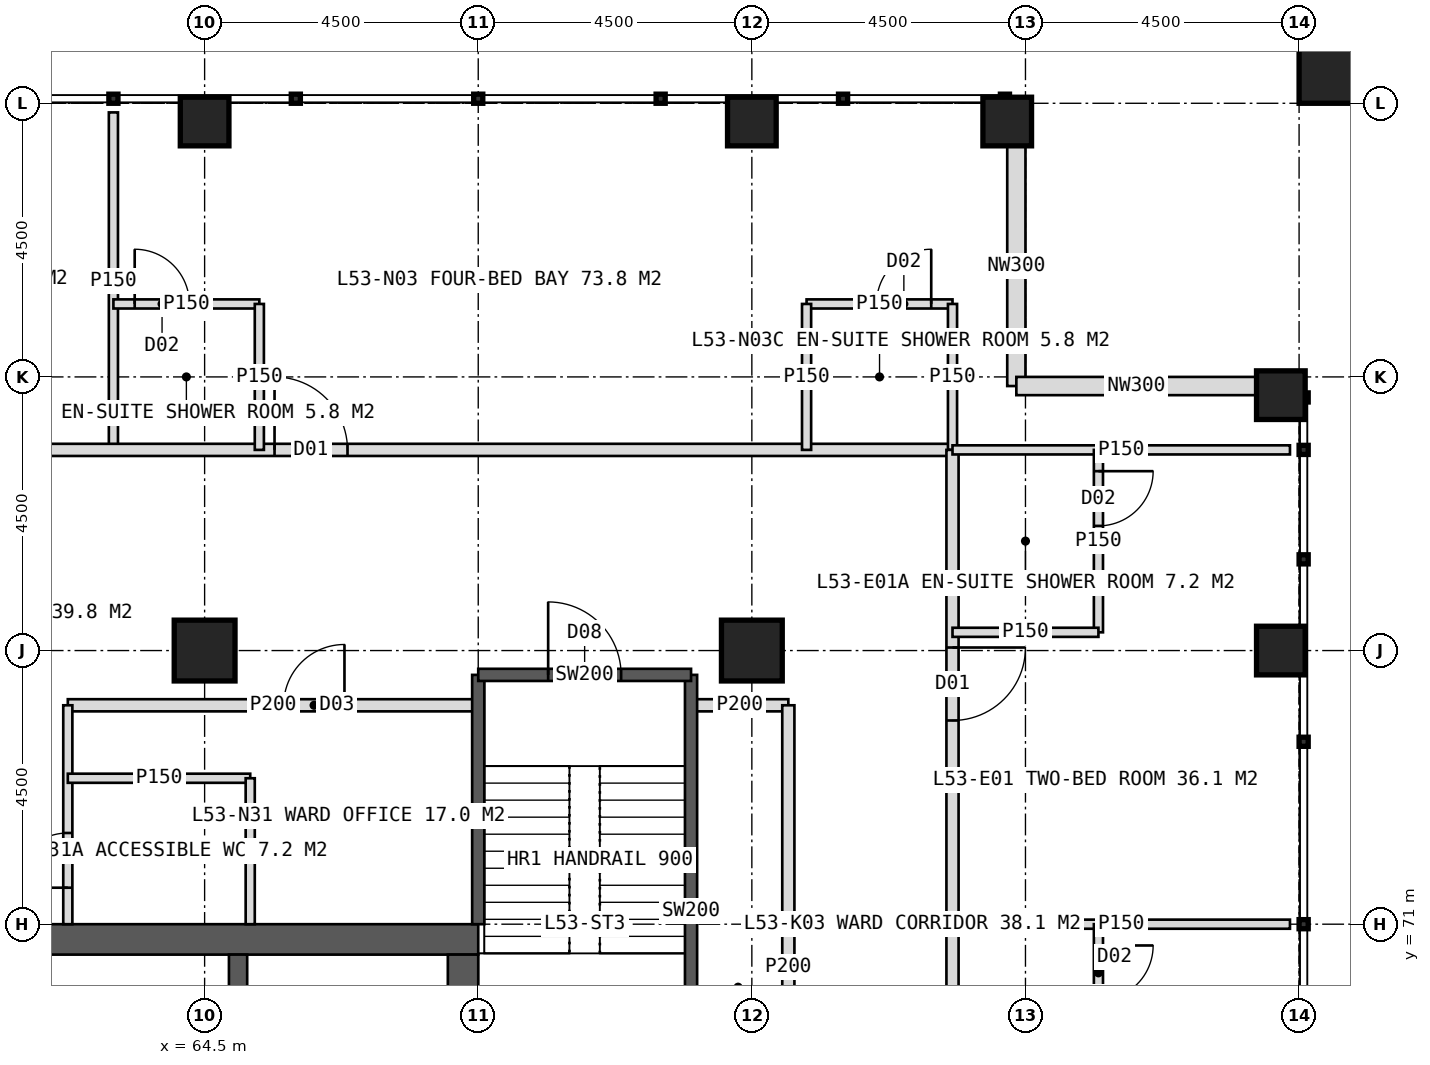
"""IFC4 building model, lengths in metres.
Left out: names, types, materials, properties, quantities, classifications, styles, units other than length and angle.
Written with IfcOpenShell. Run it as: python <this file> out.ifc"""

import sys

from ifc_helpers import new_model, si_unit, direction, frame, frame_2d, origin, origin_2d, place, context, subcontext, project, spatial, rectangle, hollow_rectangle, extrude, element, fill, save


model = new_model("IFC4")
c1 = context("Model", 3, precision=1e-05, world=origin(), true_north=direction((0.0, 1.0)))
c2 = subcontext(c1, "Body", "Model", "MODEL_VIEW")
j1 = project(units=[si_unit("LENGTHUNIT", "METRE"), si_unit("PLANEANGLEUNIT", "RADIAN")], contexts=[c1])
p1 = place(None, origin())
s1 = spatial("IfcSite", under=j1, at=p1, CompositionType="ELEMENT")
p2 = place(p1, origin())
s2 = spatial("IfcBuilding", under=s1, at=p2, CompositionType="ELEMENT")
p3 = place(p2, frame((0.0, 0.0, 221.0)))
s3 = spatial("IfcBuildingStorey", under=s2, at=p3, CompositionType="ELEMENT", Elevation=221.0)
p4 = place(p3, frame((51.0, 70.75, 0.0), z_axis=(0.0, 0.0, 1.0), x_axis=(1.0, 0.0, 0.0)))
e1 = element("IfcWall", 1, at=p4, inside=s3, PredefinedType="SHEAR", context=c2, shape_type="SweptSolid", body=[
    extrude(rectangle(XDim=18.0, YDim=0.5, at=frame_2d((9.0, 0.0))), origin(), (0.0, 0.0, 1.0), 4.0),
])
p5 = place(p4, frame((8.1, 0.0, 0.0)))
e2 = element("IfcOpeningElement", 2, at=p5, cuts=e1, PredefinedType="OPENING", context=c2, shape_type="SweptSolid", body=[
    extrude(rectangle(XDim=1.8, YDim=2.2, at=frame_2d((0.9, 1.1))), frame((0.0, 0.26, 0.0), z_axis=(0.0, -1.0, 0.0), x_axis=(1.0, 0.0, 0.0)), (0.0, 0.0, 1.0), 0.52),
])
p6 = place(p3, frame((68.75, 53.5, 0.0), z_axis=(0.0, 0.0, 1.0), x_axis=(0.0, 1.0, 0.0)))
e3 = element("IfcWall", 3, at=p6, inside=s3, PredefinedType="SHEAR", context=c2, shape_type="SweptSolid", body=[
    extrude(rectangle(XDim=17.0, YDim=0.5, at=frame_2d((8.5, 0.0))), origin(), (0.0, 0.0, 1.0), 4.0),
])
p7 = place(p6, frame((9.6, 0.0, 0.0)))
e4 = element("IfcOpeningElement", 4, at=p7, cuts=e3, PredefinedType="OPENING", context=c2, shape_type="SweptSolid", body=[
    extrude(rectangle(XDim=1.5, YDim=2.2, at=frame_2d((0.75, 1.1))), frame((0.0, 0.26, 0.0), z_axis=(0.0, -1.0, 0.0), x_axis=(1.0, 0.0, 0.0)), (0.0, 0.0, 1.0), 0.52),
])
p8 = place(p3, frame((65.05, 53.5, 0.0), z_axis=(0.0, 0.0, 1.0), x_axis=(0.0, 1.0, 0.0)))
e5 = element("IfcWall", 5, at=p8, inside=s3, PredefinedType="SHEAR", context=c2, shape_type="SweptSolid", body=[
    extrude(rectangle(XDim=17.0, YDim=0.3, at=frame_2d((8.5, 0.0))), origin(), (0.0, 0.0, 1.0), 4.0),
])
for number, where, z_axis, x_axis in (
    (6, (73.5, 75.5, 0.0), (0.0, 0.0, 1.0), (1.0, 0.0, 0.0)),
    (7, (64.5, 75.5, 0.0), (0.0, 0.0, 1.0), (1.0, 0.0, 0.0)),
):
    element("IfcColumn", number, at=place(p3, frame(where, z_axis=z_axis, x_axis=x_axis)), inside=s3, PredefinedType="COLUMN", context=c2, shape_type="SweptSolid", body=[
        extrude(hollow_rectangle(XDim=1.0, YDim=1.0, WallThickness=0.1, at=origin_2d()), origin(), (0.0, 0.0, 1.0), 4.0),
    ])
for number, where, z_axis, x_axis in (
    (8, (64.5, 84.2, 0.0), (0.0, 0.0, 1.0), (1.0, 0.0, 0.0)),
    (9, (73.5, 84.2, 0.0), (0.0, 0.0, 1.0), (1.0, 0.0, 0.0)),
    (10, (82.2, 75.5, 0.0), (0.0, 0.0, 1.0), (1.0, 0.0, 0.0)),
    (11, (77.7, 84.2, 0.0), (0.0, 0.0, 1.0), (1.0, 0.0, 0.0)),
    (12, (82.2, 79.7, 0.0), (0.0, 0.0, 1.0), (1.0, 0.0, 0.0)),
):
    element("IfcColumn", number, at=place(p3, frame(where, z_axis=z_axis, x_axis=x_axis)), inside=s3, PredefinedType="COLUMN", context=c2, shape_type="SweptSolid", body=[
        extrude(hollow_rectangle(XDim=0.8, YDim=0.8, WallThickness=0.08, at=origin_2d()), origin(), (0.0, 0.0, 1.0), 4.0),
    ])
p9 = place(p3, frame((83.1, 85.1, 0.0), z_axis=(0.0, 0.0, 1.0), x_axis=(1.0, 0.0, 0.0)))
e13 = element("IfcColumn", 13, at=p9, inside=s3, PredefinedType="COLUMN", context=c2, shape_type="SweptSolid", body=[
    extrude(hollow_rectangle(XDim=1.2, YDim=1.2, WallThickness=0.07, at=origin_2d()), origin(), (0.0, 0.0, 1.0), 4.0),
])
for number, where, z_axis, x_axis in (
    (14, (77.85, 83.8, 0.0), (0.0, 0.0, 1.0), (0.0, -1.0, 0.0)),
    (15, (77.85, 79.85, 0.0), (0.0, 0.0, 1.0), (1.0, 0.0, 0.0)),
):
    element("IfcWall", number, at=place(p3, frame(where, z_axis=z_axis, x_axis=x_axis)), inside=s3, PredefinedType="ELEMENTEDWALL", context=c2, shape_type="SweptSolid", body=[
        extrude(rectangle(XDim=3.95, YDim=0.3, at=frame_2d((1.975, 0.0))), origin(), (0.0, 0.0, 1.0), 2.85),
    ])
p10 = place(p3, frame((63.0, 78.8, 0.0), z_axis=(0.0, 0.0, 1.0), x_axis=(0.0, 1.0, 0.0)))
e16 = element("IfcWall", 16, at=p10, inside=s3, PredefinedType="PARTITIONING", context=c2, shape_type="SweptSolid", body=[
    extrude(rectangle(XDim=5.55, YDim=0.15, at=frame_2d((2.775, 0.0))), origin(), (0.0, 0.0, 1.0), 3.75),
])
p11 = place(p3, frame((43.2, 78.8, 0.0), z_axis=(0.0, 0.0, 1.0), x_axis=(1.0, 0.0, 0.0)))
e17 = element("IfcWall", 17, at=p11, inside=s3, PredefinedType="PARTITIONING", context=c2, shape_type="SweptSolid", body=[
    extrude(rectangle(XDim=33.6, YDim=0.2, at=frame_2d((16.8, 0.0))), origin(), (0.0, 0.0, 1.0), 3.75),
])
p12 = place(p11, frame((4.9, 0.0, 0.0)))
e18 = element("IfcOpeningElement", 18, at=p12, cuts=e17, PredefinedType="OPENING", context=c2, shape_type="SweptSolid", body=[
    extrude(rectangle(XDim=1.0, YDim=2.1, at=frame_2d((0.5, 1.05))), frame((0.0, 0.11, 0.0), z_axis=(0.0, -1.0, 0.0), x_axis=(1.0, 0.0, 0.0)), (0.0, 0.0, 1.0), 0.22),
])
p13 = place(p11, frame((14.05, 0.0, 0.0)))
e19 = element("IfcOpeningElement", 19, at=p13, cuts=e17, PredefinedType="OPENING", context=c2, shape_type="SweptSolid", body=[
    extrude(rectangle(XDim=1.2, YDim=2.2, at=frame_2d((0.6, 1.1))), frame((0.0, 0.11, 0.0), z_axis=(0.0, -1.0, 0.0), x_axis=(1.0, 0.0, 0.0)), (0.0, 0.0, 1.0), 0.22),
])
p14 = place(p11, frame((22.45, 0.0, 0.0)))
e20 = element("IfcOpeningElement", 20, at=p14, cuts=e17, PredefinedType="OPENING", context=c2, shape_type="SweptSolid", body=[
    extrude(rectangle(XDim=1.2, YDim=2.2, at=frame_2d((0.6, 1.1))), frame((0.0, 0.11, 0.0), z_axis=(0.0, -1.0, 0.0), x_axis=(1.0, 0.0, 0.0)), (0.0, 0.0, 1.0), 0.22),
])
p15 = place(p3, frame((63.0, 81.2, 0.0), z_axis=(0.0, 0.0, 1.0), x_axis=(1.0, 0.0, 0.0)))
e21 = element("IfcWall", 21, at=p15, inside=s3, PredefinedType="PARTITIONING", context=c2, shape_type="SweptSolid", body=[
    extrude(rectangle(XDim=2.4, YDim=0.15, at=frame_2d((1.2, 0.0))), origin(), (0.0, 0.0, 1.0), 3.75),
])
p16 = place(p15, frame((0.35, 0.0, 0.0)))
e22 = element("IfcOpeningElement", 22, at=p16, cuts=e21, PredefinedType="OPENING", context=c2, shape_type="SweptSolid", body=[
    extrude(rectangle(XDim=0.9, YDim=2.1, at=frame_2d((0.45, 1.05))), frame((0.0, 0.085, 0.0), z_axis=(0.0, -1.0, 0.0), x_axis=(1.0, 0.0, 0.0)), (0.0, 0.0, 1.0), 0.17),
])
p17 = place(p3, frame((65.4, 78.8, 0.0), z_axis=(0.0, 0.0, 1.0), x_axis=(0.0, 1.0, 0.0)))
e23 = element("IfcWall", 23, at=p17, inside=s3, PredefinedType="PARTITIONING", context=c2, shape_type="SweptSolid", body=[
    extrude(rectangle(XDim=2.4, YDim=0.15, at=frame_2d((1.2, 0.0))), origin(), (0.0, 0.0, 1.0), 3.75),
])
p18 = place(p3, frame((74.4, 81.2, 0.0), z_axis=(0.0, 0.0, 1.0), x_axis=(1.0, 0.0, 0.0)))
e24 = element("IfcWall", 24, at=p18, inside=s3, PredefinedType="PARTITIONING", context=c2, shape_type="SweptSolid", body=[
    extrude(rectangle(XDim=2.4, YDim=0.15, at=frame_2d((1.2, 0.0))), origin(), (0.0, 0.0, 1.0), 3.75),
])
p19 = place(p18, frame((1.15, 0.0, 0.0)))
e25 = element("IfcOpeningElement", 25, at=p19, cuts=e24, PredefinedType="OPENING", context=c2, shape_type="SweptSolid", body=[
    extrude(rectangle(XDim=0.9, YDim=2.1, at=frame_2d((0.45, 1.05))), frame((0.0, 0.085, 0.0), z_axis=(0.0, -1.0, 0.0), x_axis=(1.0, 0.0, 0.0)), (0.0, 0.0, 1.0), 0.17),
])
for number, where, z_axis, x_axis in (
    (26, (74.4, 78.8, 0.0), (0.0, 0.0, 1.0), (0.0, 1.0, 0.0)),
    (27, (76.8, 78.8, 0.0), (0.0, 0.0, 1.0), (0.0, 1.0, 0.0)),
):
    element("IfcWall", number, at=place(p3, frame(where, z_axis=z_axis, x_axis=x_axis)), inside=s3, PredefinedType="PARTITIONING", context=c2, shape_type="SweptSolid", body=[
        extrude(rectangle(XDim=2.4, YDim=0.15, at=frame_2d((1.2, 0.0))), origin(), (0.0, 0.0, 1.0), 3.75),
    ])
p20 = place(p3, frame((62.25, 74.6, 0.0), z_axis=(0.0, 0.0, 1.0), x_axis=(1.0, 0.0, 0.0)))
e28 = element("IfcWall", 28, at=p20, inside=s3, PredefinedType="PARTITIONING", context=c2, shape_type="SweptSolid", body=[
    extrude(rectangle(XDim=6.75, YDim=0.2, at=frame_2d((3.375, 0.0))), origin(), (0.0, 0.0, 1.0), 3.75),
])
p21 = place(p20, frame((3.55, 0.0, 0.0)))
e29 = element("IfcOpeningElement", 29, at=p21, cuts=e28, PredefinedType="OPENING", context=c2, shape_type="SweptSolid", body=[
    extrude(rectangle(XDim=1.0, YDim=2.1, at=frame_2d((0.5, 1.05))), frame((0.0, 0.11, 0.0), z_axis=(0.0, -1.0, 0.0), x_axis=(1.0, 0.0, 0.0)), (0.0, 0.0, 1.0), 0.22),
])
p22 = place(p3, frame((72.5, 74.6, 0.0), z_axis=(0.0, 0.0, 1.0), x_axis=(1.0, 0.0, 0.0)))
e30 = element("IfcWall", 30, at=p22, inside=s3, PredefinedType="PARTITIONING", context=c2, shape_type="SweptSolid", body=[
    extrude(rectangle(XDim=1.6, YDim=0.2, at=frame_2d((0.8, 0.0))), origin(), (0.0, 0.0, 1.0), 3.75),
])
p23 = place(p3, frame((62.25, 71.0, 0.0), z_axis=(0.0, 0.0, 1.0), x_axis=(0.0, 1.0, 0.0)))
e31 = element("IfcWall", 31, at=p23, inside=s3, PredefinedType="PARTITIONING", context=c2, shape_type="SweptSolid", body=[
    extrude(rectangle(XDim=3.6, YDim=0.15, at=frame_2d((1.8, 0.0))), origin(), (0.0, 0.0, 1.0), 3.75),
])
p24 = place(p23, frame((0.6, 0.0, 0.0)))
e32 = element("IfcOpeningElement", 32, at=p24, cuts=e31, PredefinedType="OPENING", context=c2, shape_type="SweptSolid", body=[
    extrude(rectangle(XDim=0.9, YDim=2.1, at=frame_2d((0.45, 1.05))), frame((0.0, 0.085, 0.0), z_axis=(0.0, -1.0, 0.0), x_axis=(1.0, 0.0, 0.0)), (0.0, 0.0, 1.0), 0.17),
])
p25 = place(p3, frame((62.25, 73.4, 0.0), z_axis=(0.0, 0.0, 1.0), x_axis=(1.0, 0.0, 0.0)))
e33 = element("IfcWall", 33, at=p25, inside=s3, PredefinedType="PARTITIONING", context=c2, shape_type="SweptSolid", body=[
    extrude(rectangle(XDim=3.0, YDim=0.15, at=frame_2d((1.5, 0.0))), origin(), (0.0, 0.0, 1.0), 3.75),
])
p26 = place(p3, frame((65.25, 71.0, 0.0), z_axis=(0.0, 0.0, 1.0), x_axis=(0.0, 1.0, 0.0)))
e34 = element("IfcWall", 34, at=p26, inside=s3, PredefinedType="PARTITIONING", context=c2, shape_type="SweptSolid", body=[
    extrude(rectangle(XDim=2.4, YDim=0.15, at=frame_2d((1.2, 0.0))), origin(), (0.0, 0.0, 1.0), 3.75),
])
p27 = place(p3, frame((76.8, 71.0, 0.0), z_axis=(0.0, 0.0, 1.0), x_axis=(1.0, 0.0, 0.0)))
e35 = element("IfcWall", 35, at=p27, inside=s3, PredefinedType="PARTITIONING", context=c2, shape_type="SweptSolid", body=[
    extrude(rectangle(XDim=5.55, YDim=0.15, at=frame_2d((2.775, 0.0))), origin(), (0.0, 0.0, 1.0), 3.75),
])
p28 = place(p3, frame((76.8, 78.8, 0.0), z_axis=(0.0, 0.0, 1.0), x_axis=(0.0, -1.0, 0.0)))
e36 = element("IfcWall", 36, at=p28, inside=s3, PredefinedType="PARTITIONING", context=c2, shape_type="SweptSolid", body=[
    extrude(rectangle(XDim=33.6, YDim=0.2, at=frame_2d((16.8, 0.0))), origin(), (0.0, 0.0, 1.0), 3.75),
])
p29 = place(p28, frame((3.25, 0.0, 0.0)))
e37 = element("IfcOpeningElement", 37, at=p29, cuts=e36, PredefinedType="OPENING", context=c2, shape_type="SweptSolid", body=[
    extrude(rectangle(XDim=1.2, YDim=2.2, at=frame_2d((0.6, 1.1))), frame((0.0, 0.11, 0.0), z_axis=(0.0, -1.0, 0.0), x_axis=(1.0, 0.0, 0.0)), (0.0, 0.0, 1.0), 0.22),
])
p30 = place(p28, frame((10.45, 0.0, 0.0)))
e38 = element("IfcOpeningElement", 38, at=p30, cuts=e36, PredefinedType="OPENING", context=c2, shape_type="SweptSolid", body=[
    extrude(rectangle(XDim=1.2, YDim=2.2, at=frame_2d((0.6, 1.1))), frame((0.0, 0.11, 0.0), z_axis=(0.0, -1.0, 0.0), x_axis=(1.0, 0.0, 0.0)), (0.0, 0.0, 1.0), 0.22),
])
p31 = place(p28, frame((14.8, 0.0, 0.0)))
e39 = element("IfcOpeningElement", 39, at=p31, cuts=e36, PredefinedType="OPENING", context=c2, shape_type="SweptSolid", body=[
    extrude(rectangle(XDim=1.0, YDim=2.1, at=frame_2d((0.5, 1.05))), frame((0.0, 0.11, 0.0), z_axis=(0.0, -1.0, 0.0), x_axis=(1.0, 0.0, 0.0)), (0.0, 0.0, 1.0), 0.22),
])
p32 = place(p28, frame((20.05, 0.0, 0.0)))
e40 = element("IfcOpeningElement", 40, at=p32, cuts=e36, PredefinedType="OPENING", context=c2, shape_type="SweptSolid", body=[
    extrude(rectangle(XDim=1.2, YDim=2.2, at=frame_2d((0.6, 1.1))), frame((0.0, 0.11, 0.0), z_axis=(0.0, -1.0, 0.0), x_axis=(1.0, 0.0, 0.0)), (0.0, 0.0, 1.0), 0.22),
])
p33 = place(p28, frame((26.95, 0.0, 0.0)))
e41 = element("IfcOpeningElement", 41, at=p33, cuts=e36, PredefinedType="OPENING", context=c2, shape_type="SweptSolid", body=[
    extrude(rectangle(XDim=1.2, YDim=2.2, at=frame_2d((0.6, 1.1))), frame((0.0, 0.11, 0.0), z_axis=(0.0, -1.0, 0.0), x_axis=(1.0, 0.0, 0.0)), (0.0, 0.0, 1.0), 0.22),
])
p34 = place(p3, frame((76.8, 78.8, 0.0), z_axis=(0.0, 0.0, 1.0), x_axis=(1.0, 0.0, 0.0)))
e42 = element("IfcWall", 42, at=p34, inside=s3, PredefinedType="PARTITIONING", context=c2, shape_type="SweptSolid", body=[
    extrude(rectangle(XDim=5.55, YDim=0.15, at=frame_2d((2.775, 0.0))), origin(), (0.0, 0.0, 1.0), 3.75),
])
p35 = place(p3, frame((79.2, 78.8, 0.0), z_axis=(0.0, 0.0, 1.0), x_axis=(0.0, -1.0, 0.0)))
e43 = element("IfcWall", 43, at=p35, inside=s3, PredefinedType="PARTITIONING", context=c2, shape_type="SweptSolid", body=[
    extrude(rectangle(XDim=3.0, YDim=0.15, at=frame_2d((1.5, 0.0))), origin(), (0.0, 0.0, 1.0), 3.75),
])
p36 = place(p35, frame((0.35, 0.0, 0.0)))
e44 = element("IfcOpeningElement", 44, at=p36, cuts=e43, PredefinedType="OPENING", context=c2, shape_type="SweptSolid", body=[
    extrude(rectangle(XDim=0.9, YDim=2.1, at=frame_2d((0.45, 1.05))), frame((0.0, 0.085, 0.0), z_axis=(0.0, -1.0, 0.0), x_axis=(1.0, 0.0, 0.0)), (0.0, 0.0, 1.0), 0.17),
])
p37 = place(p3, frame((76.8, 75.8, 0.0), z_axis=(0.0, 0.0, 1.0), x_axis=(1.0, 0.0, 0.0)))
e45 = element("IfcWall", 45, at=p37, inside=s3, PredefinedType="PARTITIONING", context=c2, shape_type="SweptSolid", body=[
    extrude(rectangle(XDim=2.4, YDim=0.15, at=frame_2d((1.2, 0.0))), origin(), (0.0, 0.0, 1.0), 3.75),
])
p38 = place(p3, frame((79.2, 71.0, 0.0), z_axis=(0.0, 0.0, 1.0), x_axis=(0.0, -1.0, 0.0)))
e46 = element("IfcWall", 46, at=p38, inside=s3, PredefinedType="PARTITIONING", context=c2, shape_type="SweptSolid", body=[
    extrude(rectangle(XDim=2.4, YDim=0.15, at=frame_2d((1.2, 0.0))), origin(), (0.0, 0.0, 1.0), 3.75),
])
p39 = place(p38, frame((0.35, 0.0, 0.0)))
e47 = element("IfcOpeningElement", 47, at=p39, cuts=e46, PredefinedType="OPENING", context=c2, shape_type="SweptSolid", body=[
    extrude(rectangle(XDim=0.9, YDim=2.1, at=frame_2d((0.45, 1.05))), frame((0.0, 0.085, 0.0), z_axis=(0.0, -1.0, 0.0), x_axis=(1.0, 0.0, 0.0)), (0.0, 0.0, 1.0), 0.17),
])
p40 = place(p3, frame((74.1, 74.6, 0.0), z_axis=(0.0, 0.0, 1.0), x_axis=(0.0, -1.0, 0.0)))
e48 = element("IfcWall", 48, at=p40, inside=s3, PredefinedType="PARTITIONING", context=c2, shape_type="SweptSolid", body=[
    extrude(rectangle(XDim=8.6, YDim=0.2, at=frame_2d((4.3, 0.0))), origin(), (0.0, 0.0, 1.0), 3.75),
])
p41 = place(p40, frame((5.6, 0.0, 0.0)))
e49 = element("IfcOpeningElement", 49, at=p41, cuts=e48, PredefinedType="OPENING", context=c2, shape_type="SweptSolid", body=[
    extrude(rectangle(XDim=1.0, YDim=2.1, at=frame_2d((0.5, 1.05))), frame((0.0, 0.11, 0.0), z_axis=(0.0, -1.0, 0.0), x_axis=(1.0, 0.0, 0.0)), (0.0, 0.0, 1.0), 0.22),
])
p42 = place(p3, frame((69.0, 71.0, 0.0), z_axis=(0.0, 0.0, 1.0), x_axis=(0.0, 1.0, 0.0)))
e50 = element("IfcWall", 50, at=p42, inside=s3, PredefinedType="SOLIDWALL", context=c2, shape_type="SweptSolid", body=[
    extrude(rectangle(XDim=4.1, YDim=0.2, at=frame_2d((2.05, 0.0))), origin(), (0.0, 0.0, 1.0), 3.75),
])
p43 = place(p3, frame((72.5, 67.35, 0.0), z_axis=(0.0, 0.0, 1.0), x_axis=(0.0, 1.0, 0.0)))
e51 = element("IfcWall", 51, at=p43, inside=s3, PredefinedType="SOLIDWALL", context=c2, shape_type="SweptSolid", body=[
    extrude(rectangle(XDim=7.75, YDim=0.2, at=frame_2d((3.875, 0.0))), origin(), (0.0, 0.0, 1.0), 3.75),
])
p44 = place(p3, frame((69.0, 75.1, 0.0), z_axis=(0.0, 0.0, 1.0), x_axis=(1.0, 0.0, 0.0)))
e52 = element("IfcWall", 52, at=p44, inside=s3, PredefinedType="SOLIDWALL", context=c2, shape_type="SweptSolid", body=[
    extrude(rectangle(XDim=3.5, YDim=0.2, at=frame_2d((1.75, 0.0))), origin(), (0.0, 0.0, 1.0), 3.75),
])
p45 = place(p44, frame((1.15, 0.0, 0.0)))
e53 = element("IfcOpeningElement", 53, at=p45, cuts=e52, PredefinedType="OPENING", context=c2, shape_type="SweptSolid", body=[
    extrude(rectangle(XDim=1.2, YDim=2.1, at=frame_2d((0.6, 1.05))), frame((0.0, 0.11, 0.0), z_axis=(0.0, -1.0, 0.0), x_axis=(1.0, 0.0, 0.0)), (0.0, 0.0, 1.0), 0.22),
])
p46 = place(p14, origin())
e54 = element("IfcDoor", 54, at=p46, inside=s3, OperationType="SINGLE_SWING_LEFT", PredefinedType="DOOR", context=c2, shape_type="SweptSolid", body=[
    extrude(rectangle(XDim=1.2, YDim=2.2, at=frame_2d((0.6, 1.1))), frame((0.0, 0.025, 0.0), z_axis=(0.0, -1.0, 0.0), x_axis=(1.0, 0.0, 0.0)), (0.0, 0.0, 1.0), 0.05),
])
fill(e20, e54)
p47 = place(p16, origin())
e55 = element("IfcDoor", 55, at=p47, inside=s3, OperationType="SINGLE_SWING_LEFT", PredefinedType="DOOR", context=c2, shape_type="SweptSolid", body=[
    extrude(rectangle(XDim=0.9, YDim=2.1, at=frame_2d((0.45, 1.05))), frame((0.0, 0.025, 0.0), z_axis=(0.0, -1.0, 0.0), x_axis=(1.0, 0.0, 0.0)), (0.0, 0.0, 1.0), 0.05),
])
fill(e22, e55)
p48 = place(p19, origin())
e56 = element("IfcDoor", 56, at=p48, inside=s3, OperationType="SINGLE_SWING_RIGHT", PredefinedType="DOOR", context=c2, shape_type="SweptSolid", body=[
    extrude(rectangle(XDim=0.9, YDim=2.1, at=frame_2d((0.45, 1.05))), frame((0.0, 0.025, 0.0), z_axis=(0.0, -1.0, 0.0), x_axis=(1.0, 0.0, 0.0)), (0.0, 0.0, 1.0), 0.05),
])
fill(e25, e56)
p49 = place(p24, origin())
e57 = element("IfcDoor", 57, at=p49, inside=s3, OperationType="SINGLE_SWING_LEFT", PredefinedType="DOOR", context=c2, shape_type="SweptSolid", body=[
    extrude(rectangle(XDim=0.9, YDim=2.1, at=frame_2d((0.45, 1.05))), frame((0.0, 0.025, 0.0), z_axis=(0.0, -1.0, 0.0), x_axis=(1.0, 0.0, 0.0)), (0.0, 0.0, 1.0), 0.05),
])
fill(e32, e57)
p50 = place(p21, origin())
e58 = element("IfcDoor", 58, at=p50, inside=s3, OperationType="SINGLE_SWING_RIGHT", PredefinedType="DOOR", context=c2, shape_type="SweptSolid", body=[
    extrude(rectangle(XDim=1.0, YDim=2.1, at=frame_2d((0.5, 1.05))), frame((0.0, 0.025, 0.0), z_axis=(0.0, -1.0, 0.0), x_axis=(1.0, 0.0, 0.0)), (0.0, 0.0, 1.0), 0.05),
])
fill(e29, e58)
p51 = place(p29, origin())
e59 = element("IfcDoor", 59, at=p51, inside=s3, OperationType="SINGLE_SWING_LEFT", PredefinedType="DOOR", context=c2, shape_type="SweptSolid", body=[
    extrude(rectangle(XDim=1.2, YDim=2.2, at=frame_2d((0.6, 1.1))), frame((0.0, 0.025, 0.0), z_axis=(0.0, -1.0, 0.0), x_axis=(1.0, 0.0, 0.0)), (0.0, 0.0, 1.0), 0.05),
])
fill(e37, e59)
p52 = place(p36, origin())
e60 = element("IfcDoor", 60, at=p52, inside=s3, OperationType="SINGLE_SWING_LEFT", PredefinedType="DOOR", context=c2, shape_type="SweptSolid", body=[
    extrude(rectangle(XDim=0.9, YDim=2.1, at=frame_2d((0.45, 1.05))), frame((0.0, 0.025, 0.0), z_axis=(0.0, -1.0, 0.0), x_axis=(1.0, 0.0, 0.0)), (0.0, 0.0, 1.0), 0.05),
])
fill(e44, e60)
p53 = place(p39, origin())
e61 = element("IfcDoor", 61, at=p53, inside=s3, OperationType="SINGLE_SWING_LEFT", PredefinedType="DOOR", context=c2, shape_type="SweptSolid", body=[
    extrude(rectangle(XDim=0.9, YDim=2.1, at=frame_2d((0.45, 1.05))), frame((0.0, 0.025, 0.0), z_axis=(0.0, -1.0, 0.0), x_axis=(1.0, 0.0, 0.0)), (0.0, 0.0, 1.0), 0.05),
])
fill(e47, e61)
p54 = place(p45, origin())
e62 = element("IfcDoor", 62, at=p54, inside=s3, OperationType="SINGLE_SWING_LEFT", PredefinedType="DOOR", context=c2, shape_type="SweptSolid", body=[
    extrude(rectangle(XDim=1.2, YDim=2.1, at=frame_2d((0.6, 1.05))), frame((0.0, 0.025, 0.0), z_axis=(0.0, -1.0, 0.0), x_axis=(1.0, 0.0, 0.0)), (0.0, 0.0, 1.0), 0.05),
])
fill(e53, e62)
save(model, sys.argv[1])
